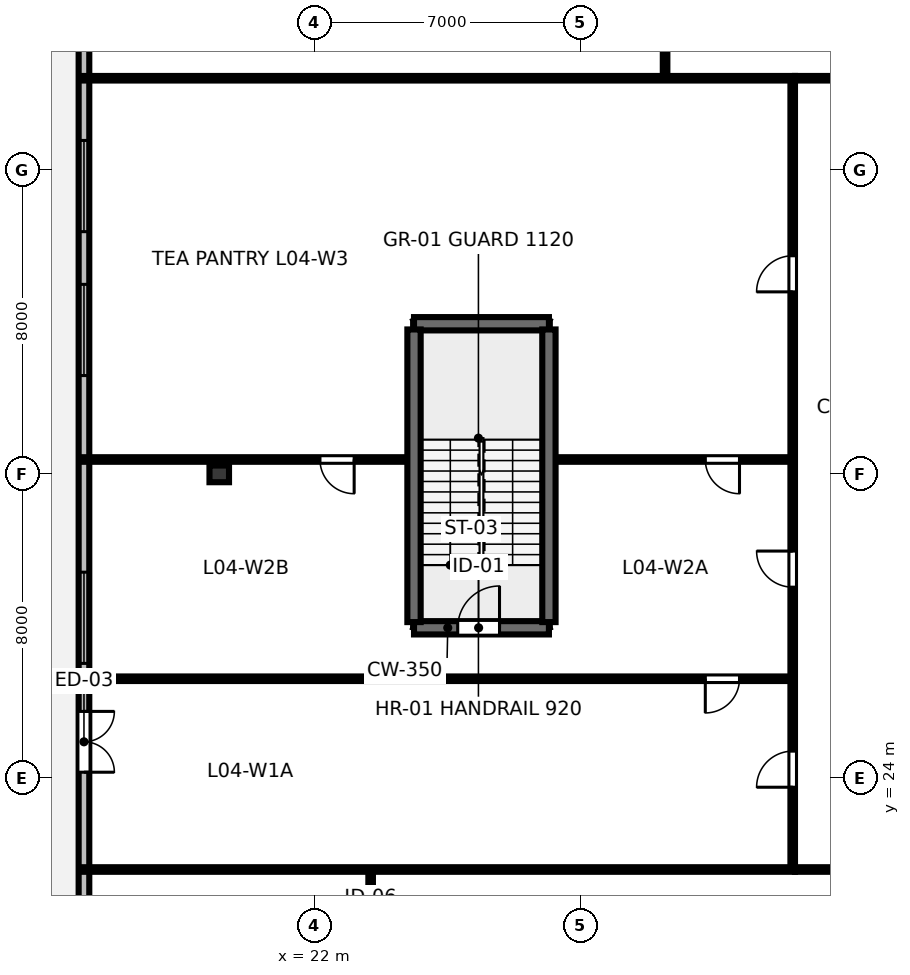
"""IFC4 building model, lengths in metres.
Left out: names, types, materials, properties, quantities, classifications, styles, units other than length and angle.
Written with IfcOpenShell. Run it as: python <this file> out.ifc"""

import sys

from ifc_helpers import new_model, si_unit, direction, frame, frame_2d, origin, origin_2d, place, context, subcontext, project, spatial, rectangle, i_section, extrude, element, fill, save


model = new_model("IFC4")
c1 = context("Model", 3, precision=1e-05, world=origin(), true_north=direction((0.0, 1.0)))
c2 = subcontext(c1, "Body", "Model", "MODEL_VIEW")
j1 = project(units=[si_unit("LENGTHUNIT", "METRE"), si_unit("PLANEANGLEUNIT", "RADIAN")], contexts=[c1])
p1 = place(None, origin())
s1 = spatial("IfcSite", under=j1, at=p1, CompositionType="ELEMENT")
p2 = place(p1, origin())
s2 = spatial("IfcBuilding", under=s1, at=p2, CompositionType="ELEMENT")
p3 = place(p2, frame((0.0, 0.0, 18.5)))
s3 = spatial("IfcBuildingStorey", under=s2, at=p3, CompositionType="ELEMENT", Elevation=18.5)
p4 = place(p3, frame((19.5, 32.0, 0.0), z_axis=(0.0, 0.0, 1.0), x_axis=(0.0, 1.0, 0.0)))
e1 = element("IfcColumn", 1, at=p4, inside=s3, PredefinedType="COLUMN", context=c2, shape_type="SweptSolid", body=[
    extrude(i_section(OverallWidth=0.439, OverallDepth=0.514, WebThickness=0.06, FlangeThickness=0.097, FilletRadius=0.025, at=origin_2d()), origin(), (0.0, 0.0, 1.0), 4.048),
])
p5 = place(p3, frame((15.94, 50.14, 0.0), z_axis=(0.0, 0.0, 1.0), x_axis=(0.0, -1.0, 0.0)))
e2 = element("IfcWall", 2, at=p5, inside=s3, PredefinedType="STANDARD", context=c2, shape_type="SweptSolid", body=[
    extrude(rectangle(XDim=36.28, YDim=0.28, at=frame_2d((18.14, 0.0))), origin(), (0.0, 0.0, 1.0), 4.05),
])
p6 = place(p5, frame((24.39, 0.0, 0.0)))
e3 = element("IfcOpeningElement", 3, at=p6, cuts=e2, PredefinedType="OPENING", context=c2, shape_type="SweptSolid", body=[
    extrude(rectangle(XDim=1.6, YDim=2.15, at=frame_2d((0.8, 1.075))), frame((0.0, 0.15, 0.0), z_axis=(0.0, -1.0, 0.0), x_axis=(1.0, 0.0, 0.0)), (0.0, 0.0, 1.0), 0.3),
])
p7 = place(p5, frame((1.793, 0.0, 0.85)))
e4 = element("IfcOpeningElement", 4, at=p7, cuts=e2, PredefinedType="OPENING", context=c2, shape_type="SweptSolid", body=[
    extrude(rectangle(XDim=2.4, YDim=2.4, at=frame_2d((1.2, 1.2))), frame((0.0, 0.15, 0.0), z_axis=(0.0, -1.0, 0.0), x_axis=(1.0, 0.0, 0.0)), (0.0, 0.0, 1.0), 0.3),
])
p8 = place(p5, frame((9.367, 0.0, 0.85)))
e5 = element("IfcOpeningElement", 5, at=p8, cuts=e2, PredefinedType="OPENING", context=c2, shape_type="SweptSolid", body=[
    extrude(rectangle(XDim=2.4, YDim=2.4, at=frame_2d((1.2, 1.2))), frame((0.0, 0.15, 0.0), z_axis=(0.0, -1.0, 0.0), x_axis=(1.0, 0.0, 0.0)), (0.0, 0.0, 1.0), 0.3),
])
p9 = place(p5, frame((13.153, 0.0, 0.85)))
e6 = element("IfcOpeningElement", 6, at=p9, cuts=e2, PredefinedType="OPENING", context=c2, shape_type="SweptSolid", body=[
    extrude(rectangle(XDim=2.4, YDim=2.4, at=frame_2d((1.2, 1.2))), frame((0.0, 0.15, 0.0), z_axis=(0.0, -1.0, 0.0), x_axis=(1.0, 0.0, 0.0)), (0.0, 0.0, 1.0), 0.3),
])
p10 = place(p5, frame((20.727, 0.0, 0.85)))
e7 = element("IfcOpeningElement", 7, at=p10, cuts=e2, PredefinedType="OPENING", context=c2, shape_type="SweptSolid", body=[
    extrude(rectangle(XDim=2.4, YDim=2.4, at=frame_2d((1.2, 1.2))), frame((0.0, 0.15, 0.0), z_axis=(0.0, -1.0, 0.0), x_axis=(1.0, 0.0, 0.0)), (0.0, 0.0, 1.0), 0.3),
])
p11 = place(p5, frame((32.087, 0.0, 0.85)))
e8 = element("IfcOpeningElement", 8, at=p11, cuts=e2, PredefinedType="OPENING", context=c2, shape_type="SweptSolid", body=[
    extrude(rectangle(XDim=2.4, YDim=2.4, at=frame_2d((1.2, 1.2))), frame((0.0, 0.15, 0.0), z_axis=(0.0, -1.0, 0.0), x_axis=(1.0, 0.0, 0.0)), (0.0, 0.0, 1.0), 0.3),
])
p12 = place(p3, frame((23.484, 21.59, 0.0), z_axis=(0.0, 0.0, 1.0), x_axis=(0.0, -1.0, 0.0)))
e9 = element("IfcWall", 9, at=p12, inside=s3, PredefinedType="MOVABLE", context=c2, shape_type="SweptSolid", body=[
    extrude(rectangle(XDim=12.25, YDim=0.12, at=frame_2d((6.125, 0.0))), origin(), (0.0, 0.0, 1.0), 2.89),
])
p13 = place(p12, frame((1.4, 0.0, 0.0)))
e10 = element("IfcOpeningElement", 10, at=p13, cuts=e9, PredefinedType="OPENING", context=c2, shape_type="SweptSolid", body=[
    extrude(rectangle(XDim=0.9, YDim=2.15, at=frame_2d((0.45, 1.075))), frame((0.0, 0.07, 0.0), z_axis=(0.0, -1.0, 0.0), x_axis=(1.0, 0.0, 0.0)), (0.0, 0.0, 1.0), 0.14),
])
p14 = place(p3, frame((34.65, 21.59, 0.0), z_axis=(0.0, 0.0, 1.0), x_axis=(1.0, 0.0, 0.0)))
e11 = element("IfcWall", 11, at=p14, inside=s3, PredefinedType="PARTITIONING", context=c2, shape_type="SweptSolid", body=[
    extrude(rectangle(XDim=22.7, YDim=0.12, at=frame_2d((11.35, 0.0))), origin(), (0.0, 0.0, 1.0), 2.89),
])
p15 = place(p14, frame((8.028, 0.0, 0.0)))
e12 = element("IfcOpeningElement", 12, at=p15, cuts=e11, PredefinedType="OPENING", context=c2, shape_type="SweptSolid", body=[
    extrude(rectangle(XDim=0.95, YDim=2.15, at=frame_2d((0.475, 1.075))), frame((0.0, 0.07, 0.0), z_axis=(0.0, -1.0, 0.0), x_axis=(1.0, 0.0, 0.0)), (0.0, 0.0, 1.0), 0.14),
])
p16 = place(p14, frame((19.238, 0.0, 0.0)))
e13 = element("IfcOpeningElement", 13, at=p16, cuts=e11, PredefinedType="OPENING", context=c2, shape_type="SweptSolid", body=[
    extrude(rectangle(XDim=0.95, YDim=2.15, at=frame_2d((0.475, 1.075))), frame((0.0, 0.07, 0.0), z_axis=(0.0, -1.0, 0.0), x_axis=(1.0, 0.0, 0.0)), (0.0, 0.0, 1.0), 0.14),
])
p17 = place(p3, frame((31.232, 42.41, 0.0), z_axis=(0.0, 0.0, 1.0), x_axis=(0.0, 1.0, 0.0)))
e14 = element("IfcWall", 14, at=p17, inside=s3, PredefinedType="PARTITIONING", context=c2, shape_type="SweptSolid", body=[
    extrude(rectangle(XDim=12.25, YDim=0.12, at=frame_2d((6.125, 0.0))), origin(), (0.0, 0.0, 1.0), 2.89),
])
p18 = place(p17, frame((1.4, 0.0, 0.0)))
e15 = element("IfcOpeningElement", 15, at=p18, cuts=e14, PredefinedType="OPENING", context=c2, shape_type="SweptSolid", body=[
    extrude(rectangle(XDim=0.9, YDim=2.15, at=frame_2d((0.45, 1.075))), frame((0.0, 0.07, 0.0), z_axis=(0.0, -1.0, 0.0), x_axis=(1.0, 0.0, 0.0)), (0.0, 0.0, 1.0), 0.14),
])
p19 = place(p3, frame((34.65, 42.41, 0.0), z_axis=(0.0, 0.0, 1.0), x_axis=(1.0, 0.0, 0.0)))
e16 = element("IfcWall", 16, at=p19, inside=s3, PredefinedType="PARTITIONING", context=c2, shape_type="SweptSolid", body=[
    extrude(rectangle(XDim=22.7, YDim=0.12, at=frame_2d((11.35, 0.0))), origin(), (0.0, 0.0, 1.0), 2.89),
])
p20 = place(p19, frame((4.792, 0.0, 0.0)))
e17 = element("IfcOpeningElement", 17, at=p20, cuts=e16, PredefinedType="OPENING", context=c2, shape_type="SweptSolid", body=[
    extrude(rectangle(XDim=0.95, YDim=2.15, at=frame_2d((0.475, 1.075))), frame((0.0, 0.07, 0.0), z_axis=(0.0, -1.0, 0.0), x_axis=(1.0, 0.0, 0.0)), (0.0, 0.0, 1.0), 0.14),
])
p21 = place(p19, frame((16.002, 0.0, 0.0)))
e18 = element("IfcOpeningElement", 18, at=p21, cuts=e16, PredefinedType="OPENING", context=c2, shape_type="SweptSolid", body=[
    extrude(rectangle(XDim=0.95, YDim=2.15, at=frame_2d((0.475, 1.075))), frame((0.0, 0.07, 0.0), z_axis=(0.0, -1.0, 0.0), x_axis=(1.0, 0.0, 0.0)), (0.0, 0.0, 1.0), 0.14),
])
p22 = place(p3, frame((34.59, 26.61, 0.0), z_axis=(0.0, 0.0, 1.0), x_axis=(-1.0, 0.0, 0.0)))
e19 = element("IfcWall", 19, at=p22, inside=s3, PredefinedType="PARTITIONING", context=c2, shape_type="SweptSolid", body=[
    extrude(rectangle(XDim=18.65, YDim=0.12, at=frame_2d((9.325, 0.0))), origin(), (0.0, 0.0, 1.0), 2.89),
])
p23 = place(p22, frame((1.4, 0.0, 0.0)))
e20 = element("IfcOpeningElement", 20, at=p23, cuts=e19, PredefinedType="OPENING", context=c2, shape_type="SweptSolid", body=[
    extrude(rectangle(XDim=0.9, YDim=2.15, at=frame_2d((0.45, 1.075))), frame((0.0, 0.07, 0.0), z_axis=(0.0, -1.0, 0.0), x_axis=(1.0, 0.0, 0.0)), (0.0, 0.0, 1.0), 0.14),
])
p24 = place(p3, frame((34.59, 32.378, 0.0), z_axis=(0.0, 0.0, 1.0), x_axis=(-1.0, 0.0, 0.0)))
e21 = element("IfcWall", 21, at=p24, inside=s3, PredefinedType="PARTITIONING", context=c2, shape_type="SweptSolid", body=[
    extrude(rectangle(XDim=6.24, YDim=0.12, at=frame_2d((3.12, 0.0))), origin(), (0.0, 0.0, 1.0), 2.89),
])
p25 = place(p24, frame((1.4, 0.0, 0.0)))
e22 = element("IfcOpeningElement", 22, at=p25, cuts=e21, PredefinedType="OPENING", context=c2, shape_type="SweptSolid", body=[
    extrude(rectangle(XDim=0.9, YDim=2.15, at=frame_2d((0.45, 1.075))), frame((0.0, 0.07, 0.0), z_axis=(0.0, -1.0, 0.0), x_axis=(1.0, 0.0, 0.0)), (0.0, 0.0, 1.0), 0.14),
])
p26 = place(p3, frame((24.45, 32.378, 0.0), z_axis=(0.0, 0.0, 1.0), x_axis=(-1.0, 0.0, 0.0)))
e23 = element("IfcWall", 23, at=p26, inside=s3, PredefinedType="PARTITIONING", context=c2, shape_type="SweptSolid", body=[
    extrude(rectangle(XDim=8.51, YDim=0.12, at=frame_2d((4.255, 0.0))), origin(), (0.0, 0.0, 1.0), 2.89),
])
p27 = place(p26, frame((1.4, 0.0, 0.0)))
e24 = element("IfcOpeningElement", 24, at=p27, cuts=e23, PredefinedType="OPENING", context=c2, shape_type="SweptSolid", body=[
    extrude(rectangle(XDim=0.9, YDim=2.15, at=frame_2d((0.45, 1.075))), frame((0.0, 0.07, 0.0), z_axis=(0.0, -1.0, 0.0), x_axis=(1.0, 0.0, 0.0)), (0.0, 0.0, 1.0), 0.14),
])
p28 = place(p3, frame((34.59, 21.65, 0.0), z_axis=(0.0, 0.0, 1.0), x_axis=(0.0, 1.0, 0.0)))
e25 = element("IfcWall", 25, at=p28, inside=s3, PredefinedType="PARTITIONING", context=c2, shape_type="SweptSolid", body=[
    extrude(rectangle(XDim=20.7, YDim=0.12, at=frame_2d((10.35, 0.0))), origin(), (0.0, 0.0, 1.0), 2.89),
])
p29 = place(p28, frame((2.105, 0.0, 0.0)))
e26 = element("IfcOpeningElement", 26, at=p29, cuts=e25, PredefinedType="OPENING", context=c2, shape_type="SweptSolid", body=[
    extrude(rectangle(XDim=0.95, YDim=2.15, at=frame_2d((0.475, 1.075))), frame((0.0, 0.07, 0.0), z_axis=(0.0, -1.0, 0.0), x_axis=(1.0, 0.0, 0.0)), (0.0, 0.0, 1.0), 0.14),
])
p30 = place(p28, frame((7.369, 0.0, 0.0)))
e27 = element("IfcOpeningElement", 27, at=p30, cuts=e25, PredefinedType="OPENING", context=c2, shape_type="SweptSolid", body=[
    extrude(rectangle(XDim=0.95, YDim=2.15, at=frame_2d((0.475, 1.075))), frame((0.0, 0.07, 0.0), z_axis=(0.0, -1.0, 0.0), x_axis=(1.0, 0.0, 0.0)), (0.0, 0.0, 1.0), 0.14),
])
p31 = place(p28, frame((15.139, 0.0, 0.0)))
e28 = element("IfcOpeningElement", 28, at=p31, cuts=e25, PredefinedType="OPENING", context=c2, shape_type="SweptSolid", body=[
    extrude(rectangle(XDim=0.95, YDim=2.15, at=frame_2d((0.475, 1.075))), frame((0.0, 0.07, 0.0), z_axis=(0.0, -1.0, 0.0), x_axis=(1.0, 0.0, 0.0)), (0.0, 0.0, 1.0), 0.14),
])
for number, where, z_axis, x_axis in (
    (29, (34.65, 21.59, 0.0), (0.0, 0.0, 1.0), (-1.0, 0.0, 0.0)),
    (30, (34.65, 42.41, 0.0), (0.0, 0.0, 1.0), (-1.0, 0.0, 0.0)),
):
    element("IfcWall", number, at=place(p3, frame(where, z_axis=z_axis, x_axis=x_axis)), inside=s3, PredefinedType="PARTITIONING", context=c2, shape_type="SweptSolid", body=[
        extrude(rectangle(XDim=18.71, YDim=0.12, at=frame_2d((9.355, 0.0))), origin(), (0.0, 0.0, 1.0), 2.89),
    ])
p32 = place(p3, frame((24.625, 27.95, 0.0), z_axis=(0.0, 0.0, 1.0), x_axis=(1.0, 0.0, 0.0)))
e31 = element("IfcWall", 31, at=p32, inside=s3, PredefinedType="SHEAR", context=c2, shape_type="SweptSolid", body=[
    extrude(rectangle(XDim=3.55, YDim=0.35, at=frame_2d((1.775, 0.0))), origin(), (0.0, 0.0, 1.0), 4.5),
])
p33 = place(p32, frame((1.15, 0.0, 0.0)))
e32 = element("IfcOpeningElement", 32, at=p33, cuts=e31, PredefinedType="OPENING", context=c2, shape_type="SweptSolid", body=[
    extrude(rectangle(XDim=1.1, YDim=2.15, at=frame_2d((0.55, 1.075))), frame((0.0, 0.185, 0.0), z_axis=(0.0, -1.0, 0.0), x_axis=(1.0, 0.0, 0.0)), (0.0, 0.0, 1.0), 0.37),
])
p34 = place(p3, frame((24.625, 35.95, 0.0), z_axis=(0.0, 0.0, 1.0), x_axis=(1.0, 0.0, 0.0)))
e33 = element("IfcWall", 33, at=p34, inside=s3, PredefinedType="SHEAR", context=c2, shape_type="SweptSolid", body=[
    extrude(rectangle(XDim=3.55, YDim=0.35, at=frame_2d((1.775, 0.0))), origin(), (0.0, 0.0, 1.0), 4.5),
])
for number, where, z_axis, x_axis in (
    (34, (24.625, 28.1, 0.0), (0.0, 0.0, 1.0), (0.0, 1.0, 0.0)),
    (35, (28.175, 28.1, 0.0), (0.0, 0.0, 1.0), (0.0, 1.0, 0.0)),
):
    element("IfcWall", number, at=place(p3, frame(where, z_axis=z_axis, x_axis=x_axis)), inside=s3, PredefinedType="SHEAR", context=c2, shape_type="SweptSolid", body=[
        extrude(rectangle(XDim=7.7, YDim=0.35, at=frame_2d((3.85, 0.0))), origin(), (0.0, 0.0, 1.0), 4.5),
    ])
p35 = place(p6, origin())
e36 = element("IfcDoor", 36, at=p35, inside=s3, OperationType="DOUBLE_DOOR_SINGLE_SWING", PredefinedType="DOOR", context=c2, shape_type="SweptSolid", body=[
    extrude(rectangle(XDim=1.6, YDim=2.15, at=frame_2d((0.8, 1.075))), frame((0.0, 0.025, 0.0), z_axis=(0.0, -1.0, 0.0), x_axis=(1.0, 0.0, 0.0)), (0.0, 0.0, 1.0), 0.05),
])
fill(e3, e36)
p36 = place(p8, origin())
e37 = element("IfcWindow", 37, at=p36, inside=s3, PartitioningType="SINGLE_PANEL", PredefinedType="WINDOW", context=c2, shape_type="SweptSolid", body=[
    extrude(rectangle(XDim=2.4, YDim=2.4, at=frame_2d((1.2, 1.2))), frame((0.0, 0.03, 0.0), z_axis=(0.0, -1.0, 0.0), x_axis=(1.0, 0.0, 0.0)), (0.0, 0.0, 1.0), 0.06),
])
fill(e5, e37)
p37 = place(p9, origin())
e38 = element("IfcWindow", 38, at=p37, inside=s3, PartitioningType="SINGLE_PANEL", PredefinedType="WINDOW", context=c2, shape_type="SweptSolid", body=[
    extrude(rectangle(XDim=2.4, YDim=2.4, at=frame_2d((1.2, 1.2))), frame((0.0, 0.03, 0.0), z_axis=(0.0, -1.0, 0.0), x_axis=(1.0, 0.0, 0.0)), (0.0, 0.0, 1.0), 0.06),
])
fill(e6, e38)
p38 = place(p10, origin())
e39 = element("IfcWindow", 39, at=p38, inside=s3, PartitioningType="SINGLE_PANEL", PredefinedType="WINDOW", context=c2, shape_type="SweptSolid", body=[
    extrude(rectangle(XDim=2.4, YDim=2.4, at=frame_2d((1.2, 1.2))), frame((0.0, 0.03, 0.0), z_axis=(0.0, -1.0, 0.0), x_axis=(1.0, 0.0, 0.0)), (0.0, 0.0, 1.0), 0.06),
])
fill(e7, e39)
p39 = place(p23, origin())
e40 = element("IfcDoor", 40, at=p39, inside=s3, OperationType="SINGLE_SWING_RIGHT", PredefinedType="DOOR", context=c2, shape_type="SweptSolid", body=[
    extrude(rectangle(XDim=0.9, YDim=2.15, at=frame_2d((0.45, 1.075))), frame((0.0, 0.025, 0.0), z_axis=(0.0, -1.0, 0.0), x_axis=(1.0, 0.0, 0.0)), (0.0, 0.0, 1.0), 0.05),
])
fill(e20, e40)
p40 = place(p25, origin())
e41 = element("IfcDoor", 41, at=p40, inside=s3, OperationType="SINGLE_SWING_LEFT", PredefinedType="DOOR", context=c2, shape_type="SweptSolid", body=[
    extrude(rectangle(XDim=0.9, YDim=2.15, at=frame_2d((0.45, 1.075))), frame((0.0, 0.025, 0.0), z_axis=(0.0, -1.0, 0.0), x_axis=(1.0, 0.0, 0.0)), (0.0, 0.0, 1.0), 0.05),
])
fill(e22, e41)
p41 = place(p27, origin())
e42 = element("IfcDoor", 42, at=p41, inside=s3, OperationType="SINGLE_SWING_LEFT", PredefinedType="DOOR", context=c2, shape_type="SweptSolid", body=[
    extrude(rectangle(XDim=0.9, YDim=2.15, at=frame_2d((0.45, 1.075))), frame((0.0, 0.025, 0.0), z_axis=(0.0, -1.0, 0.0), x_axis=(1.0, 0.0, 0.0)), (0.0, 0.0, 1.0), 0.05),
])
fill(e24, e42)
p42 = place(p29, origin())
e43 = element("IfcDoor", 43, at=p42, inside=s3, OperationType="SINGLE_SWING_LEFT", PredefinedType="DOOR", context=c2, shape_type="SweptSolid", body=[
    extrude(rectangle(XDim=0.95, YDim=2.15, at=frame_2d((0.475, 1.075))), frame((0.0, 0.025, 0.0), z_axis=(0.0, -1.0, 0.0), x_axis=(1.0, 0.0, 0.0)), (0.0, 0.0, 1.0), 0.05),
])
fill(e26, e43)
p43 = place(p30, origin())
e44 = element("IfcDoor", 44, at=p43, inside=s3, OperationType="SINGLE_SWING_RIGHT", PredefinedType="DOOR", context=c2, shape_type="SweptSolid", body=[
    extrude(rectangle(XDim=0.95, YDim=2.15, at=frame_2d((0.475, 1.075))), frame((0.0, 0.025, 0.0), z_axis=(0.0, -1.0, 0.0), x_axis=(1.0, 0.0, 0.0)), (0.0, 0.0, 1.0), 0.05),
])
fill(e27, e44)
p44 = place(p31, origin())
e45 = element("IfcDoor", 45, at=p44, inside=s3, OperationType="SINGLE_SWING_LEFT", PredefinedType="DOOR", context=c2, shape_type="SweptSolid", body=[
    extrude(rectangle(XDim=0.95, YDim=2.15, at=frame_2d((0.475, 1.075))), frame((0.0, 0.025, 0.0), z_axis=(0.0, -1.0, 0.0), x_axis=(1.0, 0.0, 0.0)), (0.0, 0.0, 1.0), 0.05),
])
fill(e28, e45)
p45 = place(p33, origin())
e46 = element("IfcDoor", 46, at=p45, inside=s3, OperationType="SINGLE_SWING_RIGHT", PredefinedType="DOOR", context=c2, shape_type="SweptSolid", body=[
    extrude(rectangle(XDim=1.1, YDim=2.15, at=frame_2d((0.55, 1.075))), frame((0.0, 0.025, 0.0), z_axis=(0.0, -1.0, 0.0), x_axis=(1.0, 0.0, 0.0)), (0.0, 0.0, 1.0), 0.05),
])
fill(e32, e46)
save(model, sys.argv[1])
